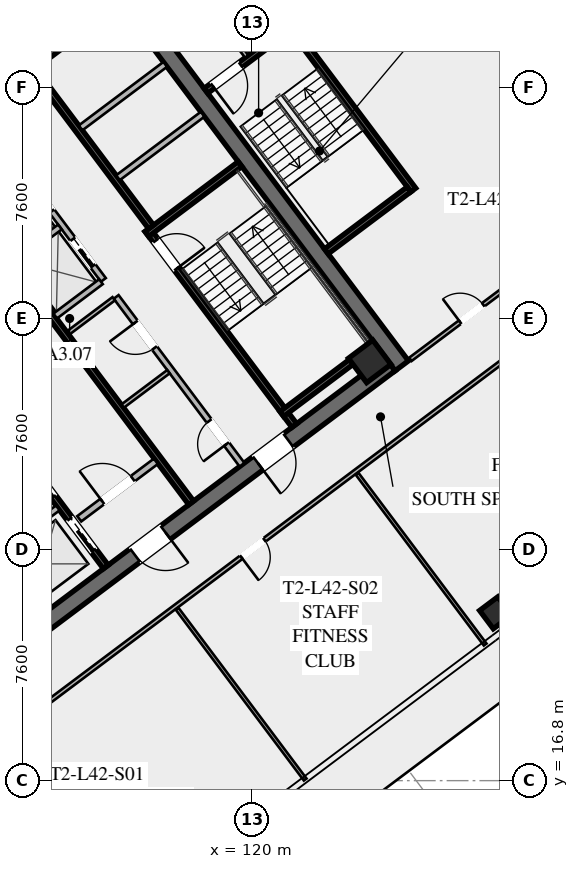
"""IFC4 building model, lengths in metres.
Left out: names, types, materials, properties, quantities, classifications, styles, units other than length and angle.
Written with IfcOpenShell. Run it as: python <this file> out.ifc"""

import sys

from ifc_helpers import new_model, si_unit, direction, frame, frame_2d, origin, origin_2d, place, context, subcontext, project, spatial, rectangle, hollow_rectangle, extrude, element, fill, save


model = new_model("IFC4")
c1 = context("Model", 3, precision=1e-05, world=origin(), true_north=direction((0.0, 1.0)))
c2 = subcontext(c1, "Body", "Model", "MODEL_VIEW")
j1 = project(units=[si_unit("LENGTHUNIT", "METRE"), si_unit("PLANEANGLEUNIT", "RADIAN")], contexts=[c1])
p1 = place(None, origin())
s1 = spatial("IfcSite", under=j1, at=p1, CompositionType="ELEMENT")
p2 = place(p1, origin())
s2 = spatial("IfcBuilding", under=s1, at=p2, CompositionType="ELEMENT")
p3 = place(p2, frame((0.0, 0.0, 157.0)))
s3 = spatial("IfcBuildingStorey", under=s2, at=p3, CompositionType="ELEMENT", Elevation=157.0)
p4 = place(p3, frame((115.564, 42.923, 0.0), z_axis=(0.0, 0.0, 1.0), x_axis=(0.600005007985, -0.799996243986, 0.0)))
e1 = element("IfcWall", 1, at=p4, inside=s3, PredefinedType="SHEAR", context=c2, shape_type="SweptSolid", body=[
    extrude(rectangle(XDim=15.6, YDim=0.55, at=frame_2d((7.8, 0.0))), origin(), (0.0, 0.0, 1.0), 3.55),
])
p5 = place(p3, frame((124.539, 30.498, 0.0), z_axis=(0.0, 0.0, 1.0), x_axis=(-0.799998054672, -0.600002593761, 0.0)))
e2 = element("IfcWall", 2, at=p5, inside=s3, PredefinedType="SHEAR", context=c2, shape_type="SweptSolid", body=[
    extrude(rectangle(XDim=15.06, YDim=0.55, at=frame_2d((7.53, 0.0))), origin(), (0.0, 0.0, 1.0), 3.55),
])
p6 = place(p5, frame((9.23, 0.0, 0.0)))
e3 = element("IfcOpeningElement", 3, at=p6, cuts=e2, PredefinedType="OPENING", context=c2, shape_type="SweptSolid", body=[
    extrude(rectangle(XDim=1.25, YDim=2.25, at=frame_2d((0.625, 1.125))), frame((0.0, 0.285, 0.0), z_axis=(0.0, -1.0, 0.0), x_axis=(1.0, 0.0, 0.0)), (0.0, 0.0, 1.0), 0.57),
])
p7 = place(p5, frame((4.18, 0.0, 0.0)))
e4 = element("IfcOpeningElement", 4, at=p7, cuts=e2, PredefinedType="OPENING", context=c2, shape_type="SweptSolid", body=[
    extrude(rectangle(XDim=1.25, YDim=2.25, at=frame_2d((0.625, 1.125))), frame((0.0, 0.285, 0.0), z_axis=(0.0, -1.0, 0.0), x_axis=(1.0, 0.0, 0.0)), (0.0, 0.0, 1.0), 0.57),
])
p8 = place(p3, frame((103.461, 33.502, 0.0), z_axis=(0.0, 0.0, 1.0), x_axis=(0.799998054672, 0.600002593761, 0.0)))
e5 = element("IfcWall", 5, at=p8, inside=s3, PredefinedType="SHEAR", context=c2, shape_type="SweptSolid", body=[
    extrude(rectangle(XDim=15.06, YDim=0.55, at=frame_2d((7.53, 0.0))), origin(), (0.0, 0.0, 1.0), 3.55),
])
p9 = place(p8, frame((4.58, 0.0, 0.0)))
e6 = element("IfcOpeningElement", 6, at=p9, cuts=e5, PredefinedType="OPENING", context=c2, shape_type="SweptSolid", body=[
    extrude(rectangle(XDim=1.25, YDim=2.25, at=frame_2d((0.625, 1.125))), frame((0.0, 0.285, 0.0), z_axis=(0.0, -1.0, 0.0), x_axis=(1.0, 0.0, 0.0)), (0.0, 0.0, 1.0), 0.57),
])
p10 = place(p8, frame((9.63, 0.0, 0.0)))
e7 = element("IfcOpeningElement", 7, at=p10, cuts=e5, PredefinedType="OPENING", context=c2, shape_type="SweptSolid", body=[
    extrude(rectangle(XDim=1.25, YDim=2.25, at=frame_2d((0.625, 1.125))), frame((0.0, 0.285, 0.0), z_axis=(0.0, -1.0, 0.0), x_axis=(1.0, 0.0, 0.0)), (0.0, 0.0, 1.0), 0.57),
])
p11 = place(p3, frame((123.87, 30.59, 0.0), z_axis=(0.0, 0.0, 1.0), x_axis=(0.799999996291, 0.600000004945, 0.0)))
e8 = element("IfcColumn", 8, at=p11, inside=s3, PredefinedType="COLUMN", context=c2, shape_type="SweptSolid", body=[
    extrude(hollow_rectangle(XDim=1.0, YDim=1.0, WallThickness=0.04, at=origin_2d()), origin(), (0.0, 0.0, 1.0), 3.37),
])
p12 = place(p3, frame((128.01, 22.32, -0.175), z_axis=(0.0, 0.0, 1.0), x_axis=(0.799999996291, 0.600000004945, 0.0)))
e9 = element("IfcColumn", 9, at=p12, inside=s3, PredefinedType="COLUMN", context=c2, shape_type="SweptSolid", body=[
    extrude(hollow_rectangle(XDim=0.75, YDim=0.75, WallThickness=0.032, at=origin_2d()), origin(), (0.0, 0.0, 1.0), 3.545),
])
p13 = place(p3, frame((116.56, 34.92, 0.0), z_axis=(0.0, 0.0, 1.0), x_axis=(0.59999029481, -0.8000072788, 0.0)))
e10 = element("IfcWall", 10, at=p13, inside=s3, PredefinedType="SHEAR", context=c2, shape_type="SweptSolid", body=[
    extrude(rectangle(XDim=8.05, YDim=0.2, at=frame_2d((4.025, 0.0))), origin(), (0.0, 0.0, 1.0), 3.37),
])
p14 = place(p13, frame((0.45, 0.0, 0.0)))
e11 = element("IfcOpeningElement", 11, at=p14, cuts=e10, PredefinedType="OPENING", context=c2, shape_type="SweptSolid", body=[
    extrude(rectangle(XDim=1.15, YDim=2.2, at=frame_2d((0.575, 1.1))), frame((0.0, 0.11, 0.0), z_axis=(0.0, -1.0, 0.0), x_axis=(1.0, 0.0, 0.0)), (0.0, 0.0, 1.0), 0.22),
])
for number, where, z_axis, x_axis in (
    (12, (116.54, 34.78, 0.0), (0.0, 0.0, 1.0), (0.8, 0.6, 0.0)),
    (13, (120.98, 28.86, 0.0), (0.0, 0.0, 1.0), (0.8, 0.6, 0.0)),
):
    element("IfcWall", number, at=place(p3, frame(where, z_axis=z_axis, x_axis=x_axis)), inside=s3, PredefinedType="SHEAR", context=c2, shape_type="SweptSolid", body=[
        extrude(rectangle(XDim=3.83, YDim=0.2, at=frame_2d((1.915, 0.0))), origin(), (0.0, 0.0, 1.0), 3.37),
    ])
p15 = place(p3, frame((117.998, 25.936, 0.0), z_axis=(0.0, 0.0, 1.0), x_axis=(-0.600002693989, 0.799997979501, 0.0)))
e14 = element("IfcWall", 14, at=p15, inside=s3, PredefinedType="SHEAR", context=c2, shape_type="SweptSolid", body=[
    extrude(rectangle(XDim=14.5, YDim=0.2, at=frame_2d((7.25, 0.0))), origin(), (0.0, 0.0, 1.0), 3.37),
])
p16 = place(p3, frame((114.316, 25.412, 0.0), z_axis=(0.0, 0.0, 1.0), x_axis=(0.800018601094, 0.59997519774, 0.0)))
e15 = element("IfcWall", 15, at=p16, inside=s3, PredefinedType="SOLIDWALL", context=c2, shape_type="SweptSolid", body=[
    extrude(rectangle(XDim=3.15, YDim=0.22, at=frame_2d((1.575, 0.0))), origin(), (0.0, 0.0, 1.0), 2.723),
])
p17 = place(p16, frame((0.95, 0.0, 0.0)))
e16 = element("IfcOpeningElement", 16, at=p17, cuts=e15, PredefinedType="OPENING", context=c2, shape_type="SweptSolid", body=[
    extrude(rectangle(XDim=1.25, YDim=2.25, at=frame_2d((0.625, 1.125))), frame((0.0, 0.12, 0.0), z_axis=(0.0, -1.0, 0.0), x_axis=(1.0, 0.0, 0.0)), (0.0, 0.0, 1.0), 0.24),
])
p18 = place(p3, frame((115.19, 23.83, 0.0), z_axis=(0.0, 0.0, 1.0), x_axis=(-0.599993943644, 0.800004542231, 0.0)))
e17 = element("IfcWall", 17, at=p18, inside=s3, PredefinedType="SHEAR", context=c2, shape_type="SweptSolid", body=[
    extrude(rectangle(XDim=6.45, YDim=0.2, at=frame_2d((3.225, 0.0))), origin(), (0.0, 0.0, 1.0), 3.37),
])
p19 = place(p18, frame((4.875, 0.0, 0.0)))
e18 = element("IfcOpeningElement", 18, at=p19, cuts=e17, PredefinedType="OPENING", context=c2, shape_type="SweptSolid", body=[
    extrude(rectangle(XDim=1.3, YDim=2.25, at=frame_2d((0.65, 1.125))), frame((0.0, 0.11, 0.0), z_axis=(0.0, -1.0, 0.0), x_axis=(1.0, 0.0, 0.0)), (0.0, 0.0, 1.0), 0.22),
])
p20 = place(p18, frame((2.875, 0.0, 0.0)))
e19 = element("IfcOpeningElement", 19, at=p20, cuts=e17, PredefinedType="OPENING", context=c2, shape_type="SweptSolid", body=[
    extrude(rectangle(XDim=1.3, YDim=2.25, at=frame_2d((0.65, 1.125))), frame((0.0, 0.11, 0.0), z_axis=(0.0, -1.0, 0.0), x_axis=(1.0, 0.0, 0.0)), (0.0, 0.0, 1.0), 0.22),
])
p21 = place(p18, frame((0.675, 0.0, 0.0)))
e20 = element("IfcOpeningElement", 20, at=p21, cuts=e17, PredefinedType="OPENING", context=c2, shape_type="SweptSolid", body=[
    extrude(rectangle(XDim=1.3, YDim=2.25, at=frame_2d((0.65, 1.125))), frame((0.0, 0.11, 0.0), z_axis=(0.0, -1.0, 0.0), x_axis=(1.0, 0.0, 0.0)), (0.0, 0.0, 1.0), 0.22),
])
p22 = place(p3, frame((110.826, 23.682, 0.0), z_axis=(0.0, 0.0, 1.0), x_axis=(0.8, 0.6, 0.0)))
e21 = element("IfcWall", 21, at=p22, inside=s3, PredefinedType="SOLIDWALL", context=c2, shape_type="SweptSolid", body=[
    extrude(rectangle(XDim=3.48, YDim=0.2, at=frame_2d((1.74, 0.0))), origin(), (0.0, 0.0, 1.0), 3.37),
])
p23 = place(p3, frame((112.81, 40.17, 0.0), z_axis=(0.0, 0.0, 1.0), x_axis=(0.599993943644, -0.800004542231, 0.0)))
e22 = element("IfcWall", 22, at=p23, inside=s3, PredefinedType="SHEAR", context=c2, shape_type="SweptSolid", body=[
    extrude(rectangle(XDim=6.45, YDim=0.2, at=frame_2d((3.225, 0.0))), origin(), (0.0, 0.0, 1.0), 3.37),
])
for number, where, z_axis, x_axis in (
    (23, (115.59, 36.63, 0.0), (0.0, 0.0, 1.0), (0.8, 0.6, 0.0)),
    (24, (114.36, 38.27, 0.0), (0.0, 0.0, 1.0), (0.8, 0.6, 0.0)),
):
    element("IfcWall", number, at=place(p3, frame(where, z_axis=z_axis, x_axis=x_axis)), inside=s3, PredefinedType="SOLIDWALL", context=c2, shape_type="SweptSolid", body=[
        extrude(rectangle(XDim=3.48, YDim=0.2, at=frame_2d((1.74, 0.0))), origin(), (0.0, 0.0, 1.0), 3.37),
    ])
p24 = place(p3, frame((119.67, 27.19, 0.0), z_axis=(0.0, 0.0, 1.0), x_axis=(-0.599988677396, 0.800008491828, 0.0)))
e25 = element("IfcWall", 25, at=p24, inside=s3, PredefinedType="SOLIDWALL", context=c2, shape_type="SweptSolid", body=[
    extrude(rectangle(XDim=6.9, YDim=0.2, at=frame_2d((3.45, 0.0))), origin(), (0.0, 0.0, 1.0), 2.723),
])
p25 = place(p24, frame((0.85, 0.0, 0.0)))
e26 = element("IfcOpeningElement", 26, at=p25, cuts=e25, PredefinedType="OPENING", context=c2, shape_type="SweptSolid", body=[
    extrude(rectangle(XDim=0.95, YDim=2.05, at=frame_2d((0.475, 1.025))), frame((0.0, 0.11, 0.0), z_axis=(0.0, -1.0, 0.0), x_axis=(1.0, 0.0, 0.0)), (0.0, 0.0, 1.0), 0.22),
])
p26 = place(p24, frame((4.8, 0.0, 0.0)))
e27 = element("IfcOpeningElement", 27, at=p26, cuts=e25, PredefinedType="OPENING", context=c2, shape_type="SweptSolid", body=[
    extrude(rectangle(XDim=1.05, YDim=2.2, at=frame_2d((0.525, 1.1))), frame((0.0, 0.11, 0.0), z_axis=(0.0, -1.0, 0.0), x_axis=(1.0, 0.0, 0.0)), (0.0, 0.0, 1.0), 0.22),
])
for number, where, z_axis, x_axis in (
    (28, (113.946, 31.522, 0.0), (0.0, 0.0, 1.0), (0.8, 0.6, 0.0)),
    (29, (115.746, 29.122, 0.0), (0.0, 0.0, 1.0), (0.8, 0.6, 0.0)),
):
    element("IfcWall", number, at=place(p3, frame(where, z_axis=z_axis, x_axis=x_axis)), inside=s3, PredefinedType="PARTITIONING", context=c2, shape_type="SweptSolid", body=[
        extrude(rectangle(XDim=1.88, YDim=0.135, at=frame_2d((0.94, 0.0))), origin(), (0.0, 0.0, 1.0), 2.723),
    ])
p27 = place(p3, frame((115.11, 33.27, 0.0), z_axis=(0.0, 0.0, 1.0), x_axis=(-0.600011322243, 0.799991508192, 0.0)))
e30 = element("IfcWall", 30, at=p27, inside=s3, PredefinedType="SOLIDWALL", context=c2, shape_type="SweptSolid", body=[
    extrude(rectangle(XDim=6.9, YDim=0.2, at=frame_2d((3.45, 0.0))), origin(), (0.0, 0.0, 1.0), 3.37),
])
p28 = place(p27, frame((0.575, 0.0, 0.0)))
e31 = element("IfcOpeningElement", 31, at=p28, cuts=e30, PredefinedType="OPENING", context=c2, shape_type="SweptSolid", body=[
    extrude(rectangle(XDim=1.1, YDim=2.2, at=frame_2d((0.55, 1.1))), frame((0.0, 0.11, 0.0), z_axis=(0.0, -1.0, 0.0), x_axis=(1.0, 0.0, 0.0)), (0.0, 0.0, 1.0), 0.22),
])
p29 = place(p27, frame((2.825, 0.0, 0.0)))
e32 = element("IfcOpeningElement", 32, at=p29, cuts=e30, PredefinedType="OPENING", context=c2, shape_type="SweptSolid", body=[
    extrude(rectangle(XDim=1.1, YDim=2.2, at=frame_2d((0.55, 1.1))), frame((0.0, 0.11, 0.0), z_axis=(0.0, -1.0, 0.0), x_axis=(1.0, 0.0, 0.0)), (0.0, 0.0, 1.0), 0.22),
])
p30 = place(p27, frame((5.075, 0.0, 0.0)))
e33 = element("IfcOpeningElement", 33, at=p30, cuts=e30, PredefinedType="OPENING", context=c2, shape_type="SweptSolid", body=[
    extrude(rectangle(XDim=1.1, YDim=2.2, at=frame_2d((0.55, 1.1))), frame((0.0, 0.11, 0.0), z_axis=(0.0, -1.0, 0.0), x_axis=(1.0, 0.0, 0.0)), (0.0, 0.0, 1.0), 0.22),
])
p31 = place(p3, frame((113.526, 32.082, 0.0), z_axis=(0.0, 0.0, 1.0), x_axis=(0.800046745961, 0.599937666993, 0.0)))
e34 = element("IfcWall", 34, at=p31, inside=s3, PredefinedType="SOLIDWALL", context=c2, shape_type="SweptSolid", body=[
    extrude(rectangle(XDim=1.88, YDim=0.2, at=frame_2d((0.94, 0.0))), origin(), (0.0, 0.0, 1.0), 3.37),
])
p32 = place(p3, frame((112.176, 33.882, 0.0), z_axis=(0.0, 0.0, 1.0), x_axis=(0.8, 0.6, 0.0)))
e35 = element("IfcWall", 35, at=p32, inside=s3, PredefinedType="SOLIDWALL", context=c2, shape_type="SweptSolid", body=[
    extrude(rectangle(XDim=1.88, YDim=0.2, at=frame_2d((0.94, 0.0))), origin(), (0.0, 0.0, 1.0), 3.37),
])
p33 = place(p3, frame((125.304, 36.228, 0.0), z_axis=(0.0, 0.0, 1.0), x_axis=(-0.59998851072, 0.800008616831, 0.0)))
e36 = element("IfcWall", 36, at=p33, inside=s3, PredefinedType="SHEAR", context=c2, shape_type="SweptSolid", body=[
    extrude(rectangle(XDim=6.8, YDim=0.2, at=frame_2d((3.4, 0.0))), origin(), (0.0, 0.0, 1.0), 3.37),
])
p34 = place(p3, frame((121.204, 41.528, 0.0), z_axis=(0.0, 0.0, 1.0), x_axis=(-0.800017232136, -0.599977023131, 0.0)))
e37 = element("IfcWall", 37, at=p34, inside=s3, PredefinedType="SHEAR", context=c2, shape_type="SweptSolid", body=[
    extrude(rectangle(XDim=3.4, YDim=0.2, at=frame_2d((1.7, 0.0))), origin(), (0.0, 0.0, 1.0), 3.37),
])
p35 = place(p34, frame((1.975, 0.0, 0.0)))
e38 = element("IfcOpeningElement", 38, at=p35, cuts=e37, PredefinedType="OPENING", context=c2, shape_type="SweptSolid", body=[
    extrude(rectangle(XDim=1.15, YDim=2.2, at=frame_2d((0.575, 1.1))), frame((0.0, 0.11, 0.0), z_axis=(0.0, -1.0, 0.0), x_axis=(1.0, 0.0, 0.0)), (0.0, 0.0, 1.0), 0.22),
])
p36 = place(p3, frame((122.444, 34.208, 0.0), z_axis=(0.0, 0.0, 1.0), x_axis=(0.79999138319, 0.600011488909, 0.0)))
e39 = element("IfcWall", 39, at=p36, inside=s3, PredefinedType="SHEAR", context=c2, shape_type="SweptSolid", body=[
    extrude(rectangle(XDim=3.4, YDim=0.2, at=frame_2d((1.7, 0.0))), origin(), (0.0, 0.0, 1.0), 3.37),
])
p37 = place(p3, frame((119.824, 40.618, 0.0), z_axis=(0.0, 0.0, 1.0), x_axis=(-0.599982243973, 0.800013316712, 0.0)))
e40 = element("IfcWall", 40, at=p37, inside=s3, PredefinedType="PARTITIONING", context=c2, shape_type="SweptSolid", body=[
    extrude(rectangle(XDim=4.4, YDim=0.135, at=frame_2d((2.2, 0.0))), origin(), (0.0, 0.0, 1.0), 2.723),
])
p38 = place(p3, frame((95.8, 32.35, 0.0), z_axis=(0.0, 0.0, 1.0), x_axis=(0.8, 0.6, 0.0)))
e41 = element("IfcWall", 41, at=p38, inside=s3, PredefinedType="PARTITIONING", context=c2, shape_type="SweptSolid", body=[
    extrude(rectangle(XDim=28.7, YDim=0.135, at=frame_2d((14.35, 0.0))), origin(), (0.0, 0.0, 1.0), 2.723),
])
p39 = place(p38, frame((0.3, 0.0, 0.0)))
e42 = element("IfcOpeningElement", 42, at=p39, cuts=e41, PredefinedType="OPENING", context=c2, shape_type="SweptSolid", body=[
    extrude(rectangle(XDim=0.95, YDim=2.05, at=frame_2d((0.475, 1.025))), frame((0.0, 0.077, 0.0), z_axis=(0.0, -1.0, 0.0), x_axis=(1.0, 0.0, 0.0)), (0.0, 0.0, 1.0), 0.155),
])
p40 = place(p38, frame((9.959, 0.0, 0.0)))
e43 = element("IfcOpeningElement", 43, at=p40, cuts=e41, PredefinedType="OPENING", context=c2, shape_type="SweptSolid", body=[
    extrude(rectangle(XDim=0.95, YDim=2.05, at=frame_2d((0.475, 1.025))), frame((0.0, 0.077, 0.0), z_axis=(0.0, -1.0, 0.0), x_axis=(1.0, 0.0, 0.0)), (0.0, 0.0, 1.0), 0.155),
])
p41 = place(p38, frame((14.005, 0.0, 0.0)))
e44 = element("IfcOpeningElement", 44, at=p41, cuts=e41, PredefinedType="OPENING", context=c2, shape_type="SweptSolid", body=[
    extrude(rectangle(XDim=0.95, YDim=2.05, at=frame_2d((0.475, 1.025))), frame((0.0, 0.077, 0.0), z_axis=(0.0, -1.0, 0.0), x_axis=(1.0, 0.0, 0.0)), (0.0, 0.0, 1.0), 0.155),
])
p42 = place(p38, frame((18.049, 0.0, 0.0)))
e45 = element("IfcOpeningElement", 45, at=p42, cuts=e41, PredefinedType="OPENING", context=c2, shape_type="SweptSolid", body=[
    extrude(rectangle(XDim=0.95, YDim=2.05, at=frame_2d((0.475, 1.025))), frame((0.0, 0.077, 0.0), z_axis=(0.0, -1.0, 0.0), x_axis=(1.0, 0.0, 0.0)), (0.0, 0.0, 1.0), 0.155),
])
p43 = place(p38, frame((27.45, 0.0, 0.0)))
e46 = element("IfcOpeningElement", 46, at=p43, cuts=e41, PredefinedType="OPENING", context=c2, shape_type="SweptSolid", body=[
    extrude(rectangle(XDim=0.95, YDim=2.05, at=frame_2d((0.475, 1.025))), frame((0.0, 0.077, 0.0), z_axis=(0.0, -1.0, 0.0), x_axis=(1.0, 0.0, 0.0)), (0.0, 0.0, 1.0), 0.155),
])
p44 = place(p3, frame((131.282, 32.874, 0.0), z_axis=(0.0, 0.0, 1.0), x_axis=(-0.8, -0.6, 0.0)))
e47 = element("IfcWall", 47, at=p44, inside=s3, PredefinedType="PARTITIONING", context=c2, shape_type="SweptSolid", body=[
    extrude(rectangle(XDim=28.7, YDim=0.135, at=frame_2d((14.35, 0.0))), origin(), (0.0, 0.0, 1.0), 2.723),
])
p45 = place(p44, frame((27.37, 0.0, 0.0)))
e48 = element("IfcOpeningElement", 48, at=p45, cuts=e47, PredefinedType="OPENING", context=c2, shape_type="SweptSolid", body=[
    extrude(rectangle(XDim=0.95, YDim=2.05, at=frame_2d((0.475, 1.025))), frame((0.0, 0.077, 0.0), z_axis=(0.0, -1.0, 0.0), x_axis=(1.0, 0.0, 0.0)), (0.0, 0.0, 1.0), 0.155),
])
p46 = place(p44, frame((13.592, 0.0, 0.0)))
e49 = element("IfcOpeningElement", 49, at=p46, cuts=e47, PredefinedType="OPENING", context=c2, shape_type="SweptSolid", body=[
    extrude(rectangle(XDim=0.95, YDim=2.05, at=frame_2d((0.475, 1.025))), frame((0.0, 0.077, 0.0), z_axis=(0.0, -1.0, 0.0), x_axis=(1.0, 0.0, 0.0)), (0.0, 0.0, 1.0), 0.155),
])
p47 = place(p44, frame((0.38, 0.0, 0.0)))
e50 = element("IfcOpeningElement", 50, at=p47, cuts=e47, PredefinedType="OPENING", context=c2, shape_type="SweptSolid", body=[
    extrude(rectangle(XDim=0.95, YDim=2.05, at=frame_2d((0.475, 1.025))), frame((0.0, 0.077, 0.0), z_axis=(0.0, -1.0, 0.0), x_axis=(1.0, 0.0, 0.0)), (0.0, 0.0, 1.0), 0.155),
])
for number, where, z_axis, x_axis in (
    (51, (121.748, 16.836, 0.0), (0.0, 0.0, 1.0), (-0.6, 0.8, 0.0)),
    (52, (127.668, 21.276, 0.0), (0.0, 0.0, 1.0), (-0.6, 0.8, 0.0)),
):
    element("IfcWall", number, at=place(p3, frame(where, z_axis=z_axis, x_axis=x_axis)), inside=s3, PredefinedType="PARTITIONING", context=c2, shape_type="SweptSolid", body=[
        extrude(rectangle(XDim=7.03, YDim=0.11, at=frame_2d((3.515, 0.0))), origin(), (0.0, 0.0, 1.0), 2.723),
    ])
p48 = place(p3, frame((125.208, 30.656, 0.0), z_axis=(0.0, 0.0, 1.0), x_axis=(0.800006797429, 0.599990936654, 0.0)))
e53 = element("IfcWall", 53, at=p48, inside=s3, PredefinedType="PARTITIONING", context=c2, shape_type="SweptSolid", body=[
    extrude(rectangle(XDim=8.62, YDim=0.135, at=frame_2d((4.31, 0.0))), origin(), (0.0, 0.0, 1.0), 2.723),
])
p49 = place(p48, frame((2.045, 0.0, 0.0)))
e54 = element("IfcOpeningElement", 54, at=p49, cuts=e53, PredefinedType="OPENING", context=c2, shape_type="SweptSolid", body=[
    extrude(rectangle(XDim=0.95, YDim=2.05, at=frame_2d((0.475, 1.025))), frame((0.0, 0.077, 0.0), z_axis=(0.0, -1.0, 0.0), x_axis=(1.0, 0.0, 0.0)), (0.0, 0.0, 1.0), 0.155),
])
p50 = place(p6, origin())
e55 = element("IfcDoor", 55, at=p50, inside=s3, OperationType="SINGLE_SWING_LEFT", PredefinedType="DOOR", context=c2, shape_type="SweptSolid", body=[
    extrude(rectangle(XDim=1.25, YDim=2.25, at=frame_2d((0.625, 1.125))), frame((0.0, 0.025, 0.0), z_axis=(0.0, -1.0, 0.0), x_axis=(1.0, 0.0, 0.0)), (0.0, 0.0, 1.0), 0.05),
])
fill(e3, e55)
p51 = place(p7, origin())
e56 = element("IfcDoor", 56, at=p51, inside=s3, OperationType="SINGLE_SWING_RIGHT", PredefinedType="DOOR", context=c2, shape_type="SweptSolid", body=[
    extrude(rectangle(XDim=1.25, YDim=2.25, at=frame_2d((0.625, 1.125))), frame((0.0, 0.025, 0.0), z_axis=(0.0, -1.0, 0.0), x_axis=(1.0, 0.0, 0.0)), (0.0, 0.0, 1.0), 0.05),
])
fill(e4, e56)
p52 = place(p14, origin())
e57 = element("IfcDoor", 57, at=p52, inside=s3, OperationType="SINGLE_SWING_RIGHT", PredefinedType="DOOR", context=c2, shape_type="SweptSolid", body=[
    extrude(rectangle(XDim=1.15, YDim=2.2, at=frame_2d((0.575, 1.1))), frame((0.0, 0.025, 0.0), z_axis=(0.0, -1.0, 0.0), x_axis=(1.0, 0.0, 0.0)), (0.0, 0.0, 1.0), 0.05),
])
fill(e11, e57)
p53 = place(p17, origin())
e58 = element("IfcDoor", 58, at=p53, inside=s3, OperationType="SINGLE_SWING_LEFT", PredefinedType="DOOR", context=c2, shape_type="SweptSolid", body=[
    extrude(rectangle(XDim=1.25, YDim=2.25, at=frame_2d((0.625, 1.125))), frame((0.0, 0.025, 0.0), z_axis=(0.0, -1.0, 0.0), x_axis=(1.0, 0.0, 0.0)), (0.0, 0.0, 1.0), 0.05),
])
fill(e16, e58)
p54 = place(p25, origin())
e59 = element("IfcDoor", 59, at=p54, inside=s3, OperationType="SINGLE_SWING_LEFT", PredefinedType="DOOR", context=c2, shape_type="SweptSolid", body=[
    extrude(rectangle(XDim=0.95, YDim=2.05, at=frame_2d((0.475, 1.025))), frame((0.0, 0.025, 0.0), z_axis=(0.0, -1.0, 0.0), x_axis=(1.0, 0.0, 0.0)), (0.0, 0.0, 1.0), 0.05),
])
fill(e26, e59)
p55 = place(p26, origin())
e60 = element("IfcDoor", 60, at=p55, inside=s3, OperationType="SINGLE_SWING_RIGHT", PredefinedType="DOOR", context=c2, shape_type="SweptSolid", body=[
    extrude(rectangle(XDim=1.05, YDim=2.2, at=frame_2d((0.525, 1.1))), frame((0.0, 0.025, 0.0), z_axis=(0.0, -1.0, 0.0), x_axis=(1.0, 0.0, 0.0)), (0.0, 0.0, 1.0), 0.05),
])
fill(e27, e60)
p56 = place(p35, origin())
e61 = element("IfcDoor", 61, at=p56, inside=s3, OperationType="SINGLE_SWING_RIGHT", PredefinedType="DOOR", context=c2, shape_type="SweptSolid", body=[
    extrude(rectangle(XDim=1.15, YDim=2.2, at=frame_2d((0.575, 1.1))), frame((0.0, 0.025, 0.0), z_axis=(0.0, -1.0, 0.0), x_axis=(1.0, 0.0, 0.0)), (0.0, 0.0, 1.0), 0.05),
])
fill(e38, e61)
p57 = place(p46, origin())
e62 = element("IfcDoor", 62, at=p57, inside=s3, OperationType="SINGLE_SWING_RIGHT", PredefinedType="DOOR", context=c2, shape_type="SweptSolid", body=[
    extrude(rectangle(XDim=0.95, YDim=2.05, at=frame_2d((0.475, 1.025))), frame((0.0, 0.025, 0.0), z_axis=(0.0, -1.0, 0.0), x_axis=(1.0, 0.0, 0.0)), (0.0, 0.0, 1.0), 0.05),
])
fill(e49, e62)
p58 = place(p49, origin())
e63 = element("IfcDoor", 63, at=p58, inside=s3, OperationType="SINGLE_SWING_LEFT", PredefinedType="DOOR", context=c2, shape_type="SweptSolid", body=[
    extrude(rectangle(XDim=0.95, YDim=2.05, at=frame_2d((0.475, 1.025))), frame((0.0, 0.025, 0.0), z_axis=(0.0, -1.0, 0.0), x_axis=(1.0, 0.0, 0.0)), (0.0, 0.0, 1.0), 0.05),
])
fill(e54, e63)
p59 = place(p20, origin())
e64 = element("IfcDoor", 64, at=p59, inside=s3, OperationType="SLIDING_TO_LEFT", PredefinedType="DOOR", context=c2, shape_type="SweptSolid", body=[
    extrude(rectangle(XDim=1.3, YDim=2.25, at=frame_2d((0.65, 1.125))), frame((0.0, 0.025, 0.0), z_axis=(0.0, -1.0, 0.0), x_axis=(1.0, 0.0, 0.0)), (0.0, 0.0, 1.0), 0.05),
])
fill(e19, e64)
p60 = place(p21, origin())
e65 = element("IfcDoor", 65, at=p60, inside=s3, OperationType="SLIDING_TO_LEFT", PredefinedType="DOOR", context=c2, shape_type="SweptSolid", body=[
    extrude(rectangle(XDim=1.3, YDim=2.25, at=frame_2d((0.65, 1.125))), frame((0.0, 0.025, 0.0), z_axis=(0.0, -1.0, 0.0), x_axis=(1.0, 0.0, 0.0)), (0.0, 0.0, 1.0), 0.05),
])
fill(e20, e65)
p61 = place(p28, origin())
e66 = element("IfcDoor", 66, at=p61, inside=s3, OperationType="SLIDING_TO_LEFT", PredefinedType="DOOR", context=c2, shape_type="SweptSolid", body=[
    extrude(rectangle(XDim=1.1, YDim=2.2, at=frame_2d((0.55, 1.1))), frame((0.0, 0.025, 0.0), z_axis=(0.0, -1.0, 0.0), x_axis=(1.0, 0.0, 0.0)), (0.0, 0.0, 1.0), 0.05),
])
fill(e31, e66)
p62 = place(p29, origin())
e67 = element("IfcDoor", 67, at=p62, inside=s3, OperationType="SLIDING_TO_LEFT", PredefinedType="DOOR", context=c2, shape_type="SweptSolid", body=[
    extrude(rectangle(XDim=1.1, YDim=2.2, at=frame_2d((0.55, 1.1))), frame((0.0, 0.025, 0.0), z_axis=(0.0, -1.0, 0.0), x_axis=(1.0, 0.0, 0.0)), (0.0, 0.0, 1.0), 0.05),
])
fill(e32, e67)
save(model, sys.argv[1])
